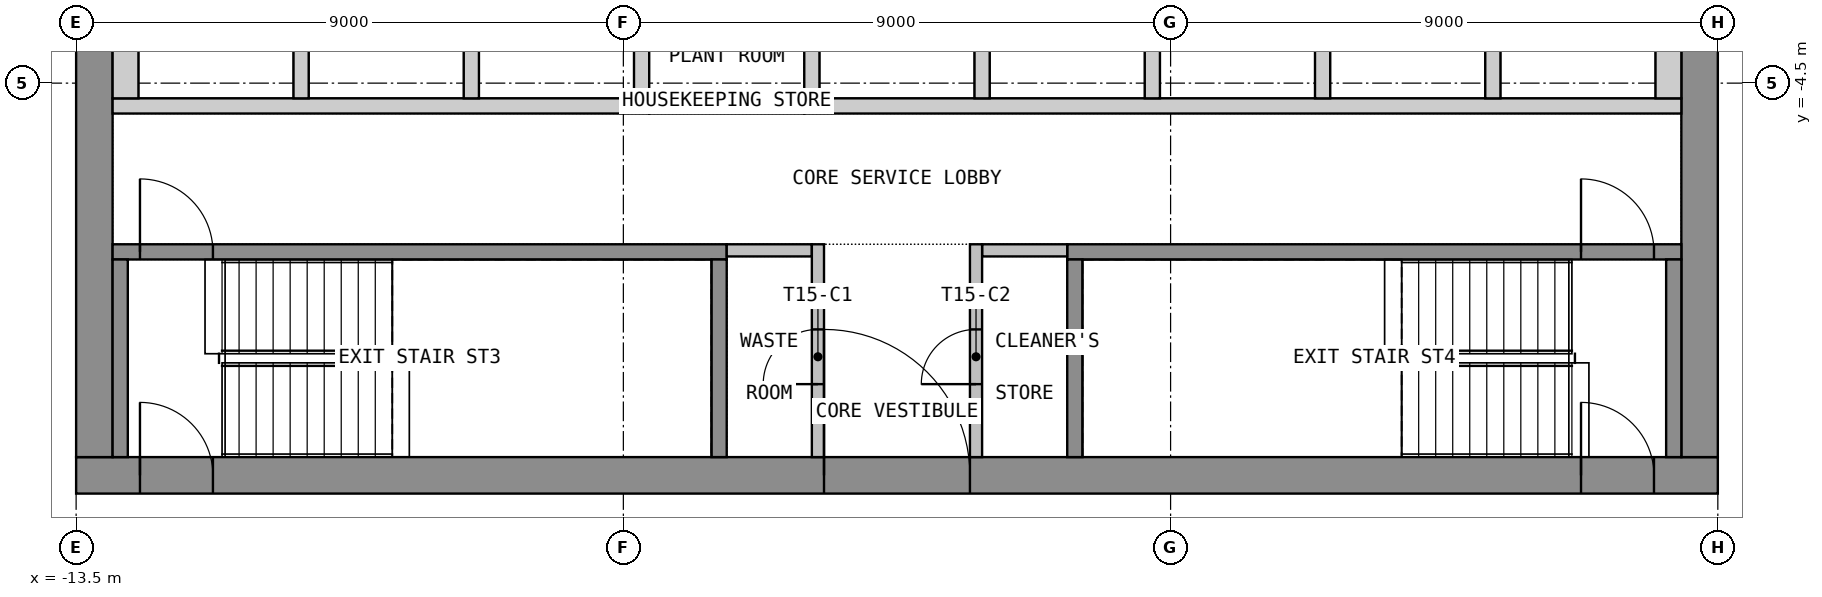
"""IFC4 building model, lengths in metres.
Left out: names, types, materials, properties, quantities, classifications, styles, units other than length and angle.
Written with IfcOpenShell. Run it as: python <this file> out.ifc"""

import sys

from ifc_helpers import new_model, si_unit, direction, frame, frame_2d, origin, place, context, subcontext, project, spatial, polyline, rectangle, outline, extrude, element, fill, save


model = new_model("IFC4")
c1 = context("Model", 3, precision=1e-05, world=origin(), true_north=direction((0.0, 1.0)))
c2 = subcontext(c1, "Body", "Model", "MODEL_VIEW")
j1 = project(units=[si_unit("LENGTHUNIT", "METRE"), si_unit("PLANEANGLEUNIT", "RADIAN")], contexts=[c1])
p1 = place(None, origin())
s1 = spatial("IfcSite", under=j1, at=p1, CompositionType="ELEMENT")
p2 = place(p1, origin())
s2 = spatial("IfcBuilding", under=s1, at=p2, CompositionType="ELEMENT")
p3 = place(p2, frame((0.0, 0.0, 207.3)))
s3 = spatial("IfcBuildingStorey", under=s2, at=p3, CompositionType="ELEMENT", Elevation=207.3)
p4 = place(p3, frame((-13.5, -10.95, 0.0), z_axis=(0.0, 0.0, 1.0), x_axis=(1.0, 0.0, 0.0)))
e1 = element("IfcWall", 1, at=p4, inside=s3, PredefinedType="SHEAR", context=c2, shape_type="SweptSolid", body=[
    extrude(rectangle(XDim=27.0, YDim=0.6, at=frame_2d((13.5, 0.0))), origin(), (0.0, 0.0, 1.0), 3.55),
])
p5 = place(p4, frame((12.3, 0.0, 0.0)))
e2 = element("IfcOpeningElement", 2, at=p5, cuts=e1, PredefinedType="OPENING", context=c2, shape_type="SweptSolid", body=[
    extrude(rectangle(XDim=2.4, YDim=2.1, at=frame_2d((1.2, 1.05))), frame((0.0, 0.31, 0.0), z_axis=(0.0, -1.0, 0.0), x_axis=(1.0, 0.0, 0.0)), (0.0, 0.0, 1.0), 0.62),
])
p6 = place(p4, frame((1.05, 0.0, 0.0)))
e3 = element("IfcOpeningElement", 3, at=p6, cuts=e1, PredefinedType="OPENING", context=c2, shape_type="SweptSolid", body=[
    extrude(rectangle(XDim=1.2, YDim=2.1, at=frame_2d((0.6, 1.05))), frame((0.0, 0.31, 0.0), z_axis=(0.0, -1.0, 0.0), x_axis=(1.0, 0.0, 0.0)), (0.0, 0.0, 1.0), 0.62),
])
p7 = place(p4, frame((24.75, 0.0, 0.0)))
e4 = element("IfcOpeningElement", 4, at=p7, cuts=e1, PredefinedType="OPENING", context=c2, shape_type="SweptSolid", body=[
    extrude(rectangle(XDim=1.2, YDim=2.1, at=frame_2d((0.6, 1.05))), frame((0.0, 0.31, 0.0), z_axis=(0.0, -1.0, 0.0), x_axis=(1.0, 0.0, 0.0)), (0.0, 0.0, 1.0), 0.62),
])
p8 = place(p3, frame((-13.2, -10.65, 0.0), z_axis=(0.0, 0.0, 1.0), x_axis=(0.0, 1.0, 0.0)))
e5 = element("IfcWall", 5, at=p8, inside=s3, PredefinedType="SHEAR", context=c2, shape_type="SweptSolid", body=[
    extrude(rectangle(XDim=21.3, YDim=0.6, at=frame_2d((10.65, 0.0))), origin(), (0.0, 0.0, 1.0), 3.55),
])
p9 = place(p8, frame((9.45, 0.0, 0.0)))
e6 = element("IfcOpeningElement", 6, at=p9, cuts=e5, PredefinedType="OPENING", context=c2, shape_type="SweptSolid", body=[
    extrude(rectangle(XDim=2.4, YDim=2.1, at=frame_2d((1.2, 1.05))), frame((0.0, 0.31, 0.0), z_axis=(0.0, -1.0, 0.0), x_axis=(1.0, 0.0, 0.0)), (0.0, 0.0, 1.0), 0.62),
])
p10 = place(p3, frame((13.2, -10.65, 0.0), z_axis=(0.0, 0.0, 1.0), x_axis=(0.0, 1.0, 0.0)))
e7 = element("IfcWall", 7, at=p10, inside=s3, PredefinedType="SHEAR", context=c2, shape_type="SweptSolid", body=[
    extrude(rectangle(XDim=21.3, YDim=0.6, at=frame_2d((10.65, 0.0))), origin(), (0.0, 0.0, 1.0), 3.55),
])
p11 = place(p10, frame((9.45, 0.0, 0.0)))
e8 = element("IfcOpeningElement", 8, at=p11, cuts=e7, PredefinedType="OPENING", context=c2, shape_type="SweptSolid", body=[
    extrude(rectangle(XDim=2.4, YDim=2.1, at=frame_2d((1.2, 1.05))), frame((0.0, 0.31, 0.0), z_axis=(0.0, -1.0, 0.0), x_axis=(1.0, 0.0, 0.0)), (0.0, 0.0, 1.0), 0.62),
])
p12 = place(p3, origin())
e9 = element("IfcWall", 9, at=p12, inside=s3, PredefinedType="SHEAR", context=c2, shape_type="SweptSolid", body=[
    extrude(outline(polyline([(-12.9, -5.0), (-4.075, -5.0), (-4.075, -4.75), (-12.9, -4.75), (-12.9, -5.0)])), origin(), (0.0, 0.0, 1.0), 3.55),
])
p13 = place(p3, origin())
e10 = element("IfcWall", 10, at=p13, inside=s3, PredefinedType="SHEAR", context=c2, shape_type="SweptSolid", body=[
    extrude(outline(polyline([(-1.525, -5.0), (12.9, -5.0), (12.9, -4.75), (-1.525, -4.75), (-1.525, -5.0)])), origin(), (0.0, 0.0, 1.0), 3.55),
])
p14 = place(p3, origin())
e11 = element("IfcWall", 11, at=p14, inside=s3, PredefinedType="SHEAR", context=c2, shape_type="SweptSolid", body=[
    extrude(outline(polyline([(-12.9, -4.75), (-12.475, -4.75), (-12.475, -3.05), (-12.9, -3.05), (-12.9, -4.75)])), origin(), (0.0, 0.0, 1.0), 3.55),
])
p15 = place(p3, origin())
e12 = element("IfcWall", 12, at=p15, inside=s3, PredefinedType="SHEAR", context=c2, shape_type="SweptSolid", body=[
    extrude(outline(polyline([(-9.925, -4.75), (-9.675, -4.75), (-9.675, -3.05), (-9.925, -3.05), (-9.925, -4.75)])), origin(), (0.0, 0.0, 1.0), 3.55),
])
p16 = place(p3, origin())
e13 = element("IfcWall", 13, at=p16, inside=s3, PredefinedType="SHEAR", context=c2, shape_type="SweptSolid", body=[
    extrude(outline(polyline([(-7.125, -4.75), (-6.875, -4.75), (-6.875, -3.05), (-7.125, -3.05), (-7.125, -4.75)])), origin(), (0.0, 0.0, 1.0), 3.55),
])
p17 = place(p3, origin())
e14 = element("IfcWall", 14, at=p17, inside=s3, PredefinedType="SHEAR", context=c2, shape_type="SweptSolid", body=[
    extrude(outline(polyline([(-4.325, -4.75), (-4.075, -4.75), (-4.075, -3.05), (-4.325, -3.05), (-4.325, -4.75)])), origin(), (0.0, 0.0, 1.0), 3.55),
])
p18 = place(p3, origin())
e15 = element("IfcWall", 15, at=p18, inside=s3, PredefinedType="SHEAR", context=c2, shape_type="SweptSolid", body=[
    extrude(outline(polyline([(-1.525, -4.75), (-1.275, -4.75), (-1.275, -2.05), (-1.525, -2.05), (-1.525, -4.75)])), origin(), (0.0, 0.0, 1.0), 3.55),
])
p19 = place(p3, origin())
e16 = element("IfcWall", 16, at=p19, inside=s3, PredefinedType="SHEAR", context=c2, shape_type="SweptSolid", body=[
    extrude(outline(polyline([(1.275, -4.75), (1.525, -4.75), (1.525, -2.05), (1.275, -2.05), (1.275, -4.75)])), origin(), (0.0, 0.0, 1.0), 3.55),
])
p20 = place(p3, origin())
e17 = element("IfcWall", 17, at=p20, inside=s3, PredefinedType="SHEAR", context=c2, shape_type="SweptSolid", body=[
    extrude(outline(polyline([(4.075, -4.75), (4.325, -4.75), (4.325, -2.05), (4.075, -2.05), (4.075, -4.75)])), origin(), (0.0, 0.0, 1.0), 3.55),
])
p21 = place(p3, origin())
e18 = element("IfcWall", 18, at=p21, inside=s3, PredefinedType="SHEAR", context=c2, shape_type="SweptSolid", body=[
    extrude(outline(polyline([(6.875, -4.75), (7.125, -4.75), (7.125, -2.05), (6.875, -2.05), (6.875, -4.75)])), origin(), (0.0, 0.0, 1.0), 3.55),
])
p22 = place(p3, origin())
e19 = element("IfcWall", 19, at=p22, inside=s3, PredefinedType="SHEAR", context=c2, shape_type="SweptSolid", body=[
    extrude(outline(polyline([(9.675, -4.75), (9.925, -4.75), (9.925, -2.05), (9.675, -2.05), (9.675, -4.75)])), origin(), (0.0, 0.0, 1.0), 3.55),
])
p23 = place(p3, origin())
e20 = element("IfcWall", 20, at=p23, inside=s3, PredefinedType="SHEAR", context=c2, shape_type="SweptSolid", body=[
    extrude(outline(polyline([(12.475, -4.75), (12.9, -4.75), (12.9, -2.05), (12.475, -2.05), (12.475, -4.75)])), origin(), (0.0, 0.0, 1.0), 3.55),
])
p24 = place(p3, frame((-12.9, -7.275, 0.0), z_axis=(0.0, 0.0, 1.0), x_axis=(1.0, 0.0, 0.0)))
e21 = element("IfcWall", 21, at=p24, inside=s3, PredefinedType="SHEAR", context=c2, shape_type="SweptSolid", body=[
    extrude(rectangle(XDim=10.1, YDim=0.25, at=frame_2d((5.05, 0.0))), origin(), (0.0, 0.0, 1.0), 3.55),
])
p25 = place(p24, frame((0.45, 0.0, 0.0)))
e22 = element("IfcOpeningElement", 22, at=p25, cuts=e21, PredefinedType="OPENING", context=c2, shape_type="SweptSolid", body=[
    extrude(rectangle(XDim=1.2, YDim=2.1, at=frame_2d((0.6, 1.05))), frame((0.0, 0.135, 0.0), z_axis=(0.0, -1.0, 0.0), x_axis=(1.0, 0.0, 0.0)), (0.0, 0.0, 1.0), 0.27),
])
for number, where, z_axis, x_axis in (
    (23, (-12.775, -10.65, 0.0), (0.0, 0.0, 1.0), (0.0, 1.0, 0.0)),
    (24, (-2.925, -10.65, 0.0), (0.0, 0.0, 1.0), (0.0, 1.0, 0.0)),
):
    element("IfcWall", number, at=place(p3, frame(where, z_axis=z_axis, x_axis=x_axis)), inside=s3, PredefinedType="SHEAR", context=c2, shape_type="SweptSolid", body=[
        extrude(rectangle(XDim=3.25, YDim=0.25, at=frame_2d((1.625, 0.0))), origin(), (0.0, 0.0, 1.0), 3.55),
    ])
p26 = place(p3, frame((2.8, -7.275, 0.0), z_axis=(0.0, 0.0, 1.0), x_axis=(1.0, 0.0, 0.0)))
e25 = element("IfcWall", 25, at=p26, inside=s3, PredefinedType="SHEAR", context=c2, shape_type="SweptSolid", body=[
    extrude(rectangle(XDim=10.1, YDim=0.25, at=frame_2d((5.05, 0.0))), origin(), (0.0, 0.0, 1.0), 3.55),
])
p27 = place(p26, frame((8.45, 0.0, 0.0)))
e26 = element("IfcOpeningElement", 26, at=p27, cuts=e25, PredefinedType="OPENING", context=c2, shape_type="SweptSolid", body=[
    extrude(rectangle(XDim=1.2, YDim=2.1, at=frame_2d((0.6, 1.05))), frame((0.0, 0.135, 0.0), z_axis=(0.0, -1.0, 0.0), x_axis=(1.0, 0.0, 0.0)), (0.0, 0.0, 1.0), 0.27),
])
for number, where, z_axis, x_axis in (
    (27, (2.925, -10.65, 0.0), (0.0, 0.0, 1.0), (0.0, 1.0, 0.0)),
    (28, (12.775, -10.65, 0.0), (0.0, 0.0, 1.0), (0.0, 1.0, 0.0)),
):
    element("IfcWall", number, at=place(p3, frame(where, z_axis=z_axis, x_axis=x_axis)), inside=s3, PredefinedType="SHEAR", context=c2, shape_type="SweptSolid", body=[
        extrude(rectangle(XDim=3.25, YDim=0.25, at=frame_2d((1.625, 0.0))), origin(), (0.0, 0.0, 1.0), 3.55),
    ])
for number, where, z_axis, x_axis in (
    (29, (-2.8, -7.25, 0.0), (0.0, 0.0, 1.0), (1.0, 0.0, 0.0)),
    (30, (1.4, -7.25, 0.0), (0.0, 0.0, 1.0), (1.0, 0.0, 0.0)),
):
    element("IfcWall", number, at=place(p3, frame(where, z_axis=z_axis, x_axis=x_axis)), inside=s3, PredefinedType="PARTITIONING", context=c2, shape_type="SweptSolid", body=[
        extrude(rectangle(XDim=1.4, YDim=0.2, at=frame_2d((0.7, 0.0))), origin(), (0.0, 0.0, 1.0), 3.55),
    ])
p28 = place(p3, frame((-1.3, -10.65, 0.0), z_axis=(0.0, 0.0, 1.0), x_axis=(0.0, 1.0, 0.0)))
e31 = element("IfcWall", 31, at=p28, inside=s3, PredefinedType="PARTITIONING", context=c2, shape_type="SweptSolid", body=[
    extrude(rectangle(XDim=3.5, YDim=0.2, at=frame_2d((1.75, 0.0))), origin(), (0.0, 0.0, 1.0), 3.55),
])
p29 = place(p28, frame((1.2, 0.0, 0.0)))
e32 = element("IfcOpeningElement", 32, at=p29, cuts=e31, PredefinedType="OPENING", context=c2, shape_type="SweptSolid", body=[
    extrude(rectangle(XDim=0.9, YDim=2.1, at=frame_2d((0.45, 1.05))), frame((0.0, 0.11, 0.0), z_axis=(0.0, -1.0, 0.0), x_axis=(1.0, 0.0, 0.0)), (0.0, 0.0, 1.0), 0.22),
])
p30 = place(p3, frame((1.3, -10.65, 0.0), z_axis=(0.0, 0.0, 1.0), x_axis=(0.0, 1.0, 0.0)))
e33 = element("IfcWall", 33, at=p30, inside=s3, PredefinedType="PARTITIONING", context=c2, shape_type="SweptSolid", body=[
    extrude(rectangle(XDim=3.5, YDim=0.2, at=frame_2d((1.75, 0.0))), origin(), (0.0, 0.0, 1.0), 3.55),
])
p31 = place(p30, frame((1.2, 0.0, 0.0)))
e34 = element("IfcOpeningElement", 34, at=p31, cuts=e33, PredefinedType="OPENING", context=c2, shape_type="SweptSolid", body=[
    extrude(rectangle(XDim=0.9, YDim=2.1, at=frame_2d((0.45, 1.05))), frame((0.0, 0.11, 0.0), z_axis=(0.0, -1.0, 0.0), x_axis=(1.0, 0.0, 0.0)), (0.0, 0.0, 1.0), 0.22),
])
p32 = place(p3, frame((-4.075, -4.9, 0.0), z_axis=(0.0, 0.0, 1.0), x_axis=(1.0, 0.0, 0.0)))
e35 = element("IfcWall", 35, at=p32, inside=s3, PredefinedType="PARTITIONING", context=c2, shape_type="SweptSolid", body=[
    extrude(rectangle(XDim=2.55, YDim=0.2, at=frame_2d((1.275, 0.0))), origin(), (0.0, 0.0, 1.0), 3.55),
])
p33 = place(p5, origin())
e36 = element("IfcDoor", 36, at=p33, inside=s3, OperationType="DOUBLE_DOOR_DOUBLE_SWING", PredefinedType="DOOR", context=c2, shape_type="SweptSolid", body=[
    extrude(rectangle(XDim=2.4, YDim=2.1, at=frame_2d((1.2, 1.05))), frame((0.0, 0.025, 0.0), z_axis=(0.0, -1.0, 0.0), x_axis=(1.0, 0.0, 0.0)), (0.0, 0.0, 1.0), 0.05),
])
fill(e2, e36)
p34 = place(p6, origin())
e37 = element("IfcDoor", 37, at=p34, inside=s3, OperationType="SINGLE_SWING_RIGHT", PredefinedType="DOOR", context=c2, shape_type="SweptSolid", body=[
    extrude(rectangle(XDim=1.2, YDim=2.1, at=frame_2d((0.6, 1.05))), frame((0.0, 0.025, 0.0), z_axis=(0.0, -1.0, 0.0), x_axis=(1.0, 0.0, 0.0)), (0.0, 0.0, 1.0), 0.05),
])
fill(e3, e37)
p35 = place(p7, origin())
e38 = element("IfcDoor", 38, at=p35, inside=s3, OperationType="SINGLE_SWING_RIGHT", PredefinedType="DOOR", context=c2, shape_type="SweptSolid", body=[
    extrude(rectangle(XDim=1.2, YDim=2.1, at=frame_2d((0.6, 1.05))), frame((0.0, 0.025, 0.0), z_axis=(0.0, -1.0, 0.0), x_axis=(1.0, 0.0, 0.0)), (0.0, 0.0, 1.0), 0.05),
])
fill(e4, e38)
p36 = place(p25, origin())
e39 = element("IfcDoor", 39, at=p36, inside=s3, OperationType="SINGLE_SWING_LEFT", PredefinedType="DOOR", context=c2, shape_type="SweptSolid", body=[
    extrude(rectangle(XDim=1.2, YDim=2.1, at=frame_2d((0.6, 1.05))), frame((0.0, 0.025, 0.0), z_axis=(0.0, -1.0, 0.0), x_axis=(1.0, 0.0, 0.0)), (0.0, 0.0, 1.0), 0.05),
])
fill(e22, e39)
p37 = place(p27, origin())
e40 = element("IfcDoor", 40, at=p37, inside=s3, OperationType="SINGLE_SWING_LEFT", PredefinedType="DOOR", context=c2, shape_type="SweptSolid", body=[
    extrude(rectangle(XDim=1.2, YDim=2.1, at=frame_2d((0.6, 1.05))), frame((0.0, 0.025, 0.0), z_axis=(0.0, -1.0, 0.0), x_axis=(1.0, 0.0, 0.0)), (0.0, 0.0, 1.0), 0.05),
])
fill(e26, e40)
p38 = place(p29, origin())
e41 = element("IfcDoor", 41, at=p38, inside=s3, OperationType="SINGLE_SWING_LEFT", PredefinedType="DOOR", context=c2, shape_type="SweptSolid", body=[
    extrude(rectangle(XDim=0.9, YDim=2.1, at=frame_2d((0.45, 1.05))), frame((0.0, 0.025, 0.0), z_axis=(0.0, -1.0, 0.0), x_axis=(1.0, 0.0, 0.0)), (0.0, 0.0, 1.0), 0.05),
])
fill(e32, e41)
p39 = place(p31, origin())
e42 = element("IfcDoor", 42, at=p39, inside=s3, OperationType="SINGLE_SWING_LEFT", PredefinedType="DOOR", context=c2, shape_type="SweptSolid", body=[
    extrude(rectangle(XDim=0.9, YDim=2.1, at=frame_2d((0.45, 1.05))), frame((0.0, 0.025, 0.0), z_axis=(0.0, -1.0, 0.0), x_axis=(1.0, 0.0, 0.0)), (0.0, 0.0, 1.0), 0.05),
])
fill(e34, e42)
save(model, sys.argv[1])
